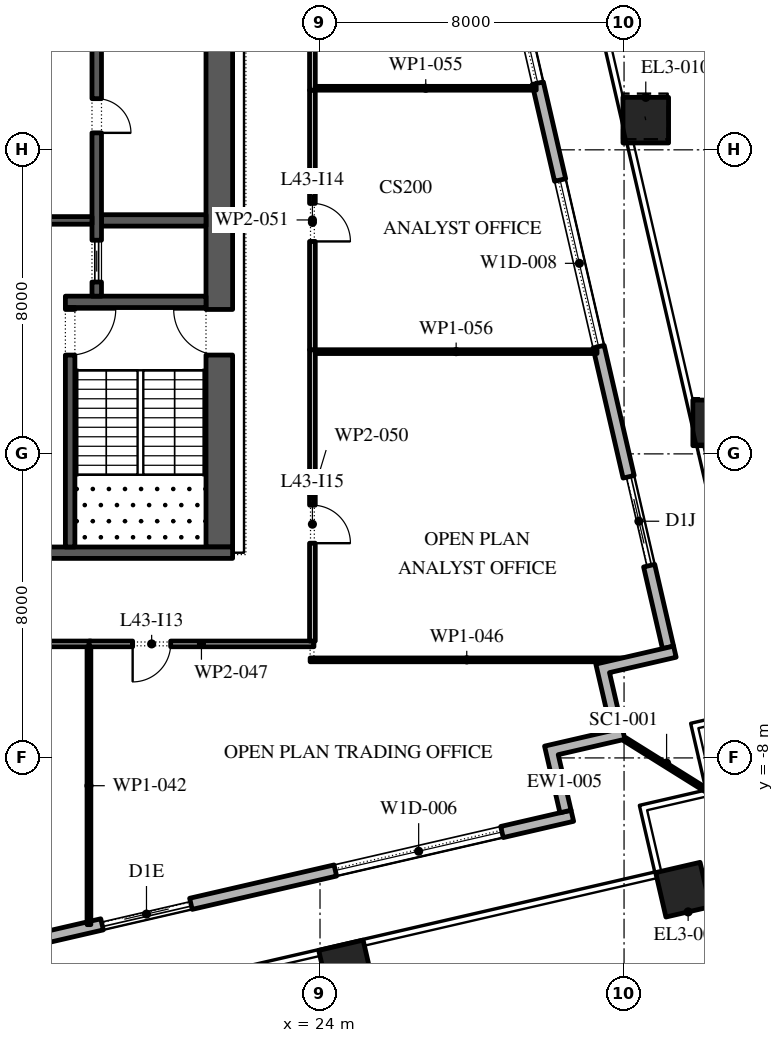
"""IFC4 building model, lengths in metres.
Left out: names, types, materials, properties, quantities, classifications, styles, units other than length and angle.
Written with IfcOpenShell. Run it as: python <this file> out.ifc"""

import sys

from ifc_helpers import new_model, si_unit, direction, frame, frame_2d, origin, origin_2d, place, context, subcontext, project, spatial, polyline, rectangle, outline, extrude, element, fill, save


model = new_model("IFC4")
c1 = context("Model", 3, precision=1e-05, world=origin(), true_north=direction((0.0, 1.0)))
c2 = subcontext(c1, "Body", "Model", "MODEL_VIEW")
j1 = project(units=[si_unit("LENGTHUNIT", "METRE"), si_unit("PLANEANGLEUNIT", "RADIAN")], contexts=[c1])
p1 = place(None, origin())
s1 = spatial("IfcSite", under=j1, at=p1, CompositionType="ELEMENT")
p2 = place(p1, origin())
s2 = spatial("IfcBuilding", under=s1, at=p2, CompositionType="ELEMENT")
p3 = place(p2, frame((0.0, 0.0, 196.8)))
s3 = spatial("IfcBuildingStorey", under=s2, at=p3, CompositionType="ELEMENT", Elevation=196.8)
for number, where, z_axis, x_axis in (
    (1, (24.685, -13.514, 0.0), (0.0, 0.0, 1.0), (0.974, 0.225, 0.0)),
    (2, (33.551, -11.467, 0.0), (0.0, 0.0, 1.0), (0.974, 0.225, 0.0)),
):
    element("IfcColumn", number, at=place(p3, frame(where, z_axis=z_axis, x_axis=x_axis)), inside=s3, PredefinedType="COLUMN", context=c2, shape_type="SweptSolid", body=[
        extrude(rectangle(XDim=1.2, YDim=1.2, at=origin_2d()), origin(), (0.0, 0.0, 1.0), 4.2),
    ])
p4 = place(p3, frame((34.41, 0.816, 0.0), z_axis=(-0.002731884952, 0.01168316756, 0.999928017609), x_axis=(-0.973733900744, -0.227689021567, 0.0)))
e3 = element("IfcColumn", 3, at=p4, inside=s3, PredefinedType="COLUMN", context=c2, shape_type="SweptSolid", body=[
    extrude(rectangle(XDim=1.2, YDim=1.2, at=origin_2d()), origin(), (0.0, 0.0, 1.0), 4.2),
])
p5 = place(p3, frame((32.572, 8.781, 0.0), z_axis=(-0.005404479485, 0.023361298418, 0.999712479335), x_axis=(-0.974268511785, -0.225390476607, 0.0)))
e4 = element("IfcColumn", 4, at=p5, inside=s3, PredefinedType="COLUMN", context=c2, shape_type="SweptSolid", body=[
    extrude(rectangle(XDim=1.2, YDim=1.2, at=origin_2d()), origin(), (0.0, 0.0, 1.0), 4.201),
])
p6 = place(p3, frame((-17.592, -20.657, 0.0), z_axis=(0.0, 0.0, 1.0), x_axis=(0.974370243697, 0.224950279389, 0.0)))
e5 = element("IfcWall", 5, at=p6, inside=s3, PredefinedType="STANDARD", context=c2, shape_type="SweptSolid", body=[
    extrude(rectangle(XDim=49.5, YDim=0.3, at=frame_2d((24.75, 0.0))), origin(), (0.0, 0.0, 1.0), 4.0),
])
p7 = place(p6, frame((2.8, 0.0, 0.0)))
e6 = element("IfcOpeningElement", 6, at=p7, cuts=e5, PredefinedType="OPENING", context=c2, shape_type="SweptSolid", body=[
    extrude(rectangle(XDim=2.4, YDim=3.5, at=frame_2d((1.2, 1.75))), frame((0.0, 0.16, 0.0), z_axis=(0.0, -1.0, 0.0), x_axis=(1.0, 0.0, 0.0)), (0.0, 0.0, 1.0), 0.32),
])
p8 = place(p6, frame((9.9, 0.0, 0.45)))
e7 = element("IfcOpeningElement", 7, at=p8, cuts=e5, PredefinedType="OPENING", context=c2, shape_type="SweptSolid", body=[
    extrude(rectangle(XDim=4.5, YDim=2.575, at=frame_2d((2.25, 1.288))), frame((0.0, 0.16, 0.0), z_axis=(0.0, -1.0, 0.0), x_axis=(1.0, 0.0, 0.0)), (0.0, 0.0, 1.0), 0.32),
])
p9 = place(p6, frame((18.2, 0.0, 0.45)))
e8 = element("IfcOpeningElement", 8, at=p9, cuts=e5, PredefinedType="OPENING", context=c2, shape_type="SweptSolid", body=[
    extrude(rectangle(XDim=4.5, YDim=3.05, at=frame_2d((2.25, 1.525))), frame((0.0, 0.16, 0.0), z_axis=(0.0, -1.0, 0.0), x_axis=(1.0, 0.0, 0.0)), (0.0, 0.0, 1.0), 0.32),
])
p10 = place(p6, frame((26.5, 0.0, 0.45)))
e9 = element("IfcOpeningElement", 9, at=p10, cuts=e5, PredefinedType="OPENING", context=c2, shape_type="SweptSolid", body=[
    extrude(rectangle(XDim=4.5, YDim=2.75, at=frame_2d((2.25, 1.375))), frame((0.0, 0.16, 0.0), z_axis=(0.0, -1.0, 0.0), x_axis=(1.0, 0.0, 0.0)), (0.0, 0.0, 1.0), 0.32),
])
p11 = place(p6, frame((36.8, 0.0, 0.0)))
e10 = element("IfcOpeningElement", 10, at=p11, cuts=e5, PredefinedType="OPENING", context=c2, shape_type="SweptSolid", body=[
    extrude(rectangle(XDim=2.4, YDim=3.275, at=frame_2d((1.2, 1.637))), frame((0.0, 0.16, 0.0), z_axis=(0.0, -1.0, 0.0), x_axis=(1.0, 0.0, 0.0)), (0.0, 0.0, 1.0), 0.32),
])
p12 = place(p6, frame((43.1, 0.0, 0.45)))
e11 = element("IfcOpeningElement", 11, at=p12, cuts=e5, PredefinedType="OPENING", context=c2, shape_type="SweptSolid", body=[
    extrude(rectangle(XDim=4.5, YDim=2.875, at=frame_2d((2.25, 1.438))), frame((0.0, 0.16, 0.0), z_axis=(0.0, -1.0, 0.0), x_axis=(1.0, 0.0, 0.0)), (0.0, 0.0, 1.0), 0.32),
])
p13 = place(p3, frame((33.157, -5.092, 0.0), z_axis=(0.0, 0.0, 1.0), x_axis=(-0.224950279389, 0.974370243697, 0.0)))
e12 = element("IfcWall", 12, at=p13, inside=s3, PredefinedType="STANDARD", context=c2, shape_type="SweptSolid", body=[
    extrude(rectangle(XDim=49.5, YDim=0.3, at=frame_2d((24.75, 0.0))), origin(), (0.0, 0.0, 1.0), 4.0),
])
p14 = place(p13, frame((2.207, 0.0, 0.0)))
e13 = element("IfcOpeningElement", 13, at=p14, cuts=e12, PredefinedType="OPENING", context=c2, shape_type="SweptSolid", body=[
    extrude(rectangle(XDim=2.4, YDim=3.125, at=frame_2d((1.2, 1.562))), frame((0.0, 0.16, 0.0), z_axis=(0.0, -1.0, 0.0), x_axis=(1.0, 0.0, 0.0)), (0.0, 0.0, 1.0), 0.32),
])
p15 = place(p13, frame((8.121, 0.0, 0.45)))
e14 = element("IfcOpeningElement", 14, at=p15, cuts=e12, PredefinedType="OPENING", context=c2, shape_type="SweptSolid", body=[
    extrude(rectangle(XDim=4.5, YDim=2.875, at=frame_2d((2.25, 1.438))), frame((0.0, 0.16, 0.0), z_axis=(0.0, -1.0, 0.0), x_axis=(1.0, 0.0, 0.0)), (0.0, 0.0, 1.0), 0.32),
])
p16 = place(p13, frame((15.236, 0.0, 0.45)))
e15 = element("IfcOpeningElement", 15, at=p16, cuts=e12, PredefinedType="OPENING", context=c2, shape_type="SweptSolid", body=[
    extrude(rectangle(XDim=4.5, YDim=2.875, at=frame_2d((2.25, 1.438))), frame((0.0, 0.16, 0.0), z_axis=(0.0, -1.0, 0.0), x_axis=(1.0, 0.0, 0.0)), (0.0, 0.0, 1.0), 0.32),
])
p17 = place(p13, frame((22.35, 0.0, 0.45)))
e16 = element("IfcOpeningElement", 16, at=p17, cuts=e12, PredefinedType="OPENING", context=c2, shape_type="SweptSolid", body=[
    extrude(rectangle(XDim=4.5, YDim=3.0, at=frame_2d((2.25, 1.5))), frame((0.0, 0.16, 0.0), z_axis=(0.0, -1.0, 0.0), x_axis=(1.0, 0.0, 0.0)), (0.0, 0.0, 1.0), 0.32),
])
p18 = place(p13, frame((30.514, 0.0, 0.0)))
e17 = element("IfcOpeningElement", 17, at=p18, cuts=e12, PredefinedType="OPENING", context=c2, shape_type="SweptSolid", body=[
    extrude(rectangle(XDim=2.4, YDim=3.45, at=frame_2d((1.2, 1.725))), frame((0.0, 0.16, 0.0), z_axis=(0.0, -1.0, 0.0), x_axis=(1.0, 0.0, 0.0)), (0.0, 0.0, 1.0), 0.32),
])
p19 = place(p13, frame((36.579, 0.0, 0.45)))
e18 = element("IfcOpeningElement", 18, at=p19, cuts=e12, PredefinedType="OPENING", context=c2, shape_type="SweptSolid", body=[
    extrude(rectangle(XDim=4.5, YDim=3.05, at=frame_2d((2.25, 1.525))), frame((0.0, 0.16, 0.0), z_axis=(0.0, -1.0, 0.0), x_axis=(1.0, 0.0, 0.0)), (0.0, 0.0, 1.0), 0.32),
])
p20 = place(p13, frame((43.693, 0.0, 0.45)))
e19 = element("IfcOpeningElement", 19, at=p20, cuts=e12, PredefinedType="OPENING", context=c2, shape_type="SweptSolid", body=[
    extrude(rectangle(XDim=4.5, YDim=3.05, at=frame_2d((2.25, 1.525))), frame((0.0, 0.16, 0.0), z_axis=(0.0, -1.0, 0.0), x_axis=(1.0, 0.0, 0.0)), (0.0, 0.0, 1.0), 0.32),
])
p21 = place(p3, origin())
e20 = element("IfcWall", 20, at=p21, inside=s3, PredefinedType="STANDARD", context=c2, shape_type="SweptSolid", body=[
    extrude(outline(polyline([(31.662, -7.285), (31.257, -5.531), (33.303, -5.058), (33.371, -5.351), (31.617, -5.756), (32.022, -7.51), (30.268, -7.914), (30.605, -9.376), (30.313, -9.443), (29.908, -7.69), (31.662, -7.285)])), origin(), (0.0, 0.0, 1.0), 4.0),
])
p22 = place(p3, frame((32.022, -7.51, -0.05), z_axis=(0.0, 0.0, 1.0), x_axis=(0.848047176257, -0.529920736377, 0.0)))
e21 = element("IfcWall", 21, at=p22, inside=s3, PredefinedType="STANDARD", context=c2, shape_type="SweptSolid", body=[
    extrude(rectangle(XDim=2.526, YDim=0.1, at=frame_2d((1.263, 0.0))), origin(), (0.0, 0.0, 1.0), 4.05),
])
p23 = place(p3, frame((21.35, -2.45, 0.0), z_axis=(0.0, 0.0, 1.0), x_axis=(0.0, 1.0, 0.0)))
e22 = element("IfcWall", 22, at=p23, inside=s3, PredefinedType="SHEAR", context=c2, shape_type="SweptSolid", body=[
    extrude(rectangle(XDim=27.9, YDim=0.7, at=frame_2d((13.95, 0.0))), origin(), (0.0, 0.0, 1.0), 4.0),
])
p24 = place(p23, frame((5.05, 0.0, 0.0)))
e23 = element("IfcOpeningElement", 23, at=p24, cuts=e22, PredefinedType="OPENING", context=c2, shape_type="SweptSolid", body=[
    extrude(rectangle(XDim=1.2, YDim=2.1, at=frame_2d((0.6, 1.05))), frame((0.0, 0.36, 0.0), z_axis=(0.0, -1.0, 0.0), x_axis=(1.0, 0.0, 0.0)), (0.0, 0.0, 1.0), 0.72),
])
p25 = place(p23, frame((21.65, 0.0, 0.0)))
e24 = element("IfcOpeningElement", 24, at=p25, cuts=e22, PredefinedType="OPENING", context=c2, shape_type="SweptSolid", body=[
    extrude(rectangle(XDim=1.2, YDim=2.1, at=frame_2d((0.6, 1.05))), frame((0.0, 0.36, 0.0), z_axis=(0.0, -1.0, 0.0), x_axis=(1.0, 0.0, 0.0)), (0.0, 0.0, 1.0), 0.72),
])
p26 = place(p3, frame((10.3, -2.6, 0.0), z_axis=(0.0, 0.0, 1.0), x_axis=(1.0, 0.0, 0.0)))
e25 = element("IfcWall", 25, at=p26, inside=s3, PredefinedType="SHEAR", context=c2, shape_type="SweptSolid", body=[
    extrude(rectangle(XDim=11.4, YDim=0.3, at=frame_2d((5.7, 0.0))), origin(), (0.0, 0.0, 1.0), 4.0),
])
p27 = place(p3, frame((17.3, 4.0, 0.0), z_axis=(0.0, 0.0, 1.0), x_axis=(1.0, 0.0, 0.0)))
e26 = element("IfcWall", 26, at=p27, inside=s3, PredefinedType="SHEAR", context=c2, shape_type="SweptSolid", body=[
    extrude(rectangle(XDim=3.7, YDim=0.3, at=frame_2d((1.85, 0.0))), origin(), (0.0, 0.0, 1.0), 4.0),
])
p28 = place(p3, frame((17.425, -2.45, 0.0), z_axis=(0.0, 0.0, 1.0), x_axis=(0.0, 1.0, 0.0)))
e27 = element("IfcWall", 27, at=p28, inside=s3, PredefinedType="SHEAR", context=c2, shape_type="SweptSolid", body=[
    extrude(rectangle(XDim=6.3, YDim=0.25, at=frame_2d((3.15, 0.0))), origin(), (0.0, 0.0, 1.0), 4.0),
])
p29 = place(p28, frame((5.05, 0.0, 0.0)))
e28 = element("IfcOpeningElement", 28, at=p29, cuts=e27, PredefinedType="OPENING", context=c2, shape_type="SweptSolid", body=[
    extrude(rectangle(XDim=1.2, YDim=2.1, at=frame_2d((0.6, 1.05))), frame((0.0, 0.135, 0.0), z_axis=(0.0, -1.0, 0.0), x_axis=(1.0, 0.0, 0.0)), (0.0, 0.0, 1.0), 0.27),
])
p30 = place(p3, frame((18.25, 6.143, 0.0), z_axis=(0.0, 0.0, 1.0), x_axis=(1.0, 0.0, 0.0)))
e29 = element("IfcWall", 29, at=p30, inside=s3, PredefinedType="SHEAR", context=c2, shape_type="SweptSolid", body=[
    extrude(rectangle(XDim=2.75, YDim=0.3, at=frame_2d((1.375, 0.0))), origin(), (0.0, 0.0, 1.0), 4.0),
])
p31 = place(p3, frame((18.125, 4.15, 0.0), z_axis=(0.0, 0.0, 1.0), x_axis=(0.0, 1.0, 0.0)))
e30 = element("IfcWall", 30, at=p31, inside=s3, PredefinedType="SHEAR", context=c2, shape_type="SweptSolid", body=[
    extrude(rectangle(XDim=14.7, YDim=0.25, at=frame_2d((7.35, 0.0))), origin(), (0.0, 0.0, 1.0), 4.0),
])
p32 = place(p31, frame((4.296, 0.0, 0.0)))
e31 = element("IfcOpeningElement", 31, at=p32, cuts=e30, PredefinedType="OPENING", context=c2, shape_type="SweptSolid", body=[
    extrude(rectangle(XDim=0.9, YDim=2.1, at=frame_2d((0.45, 1.05))), frame((0.0, 0.135, 0.0), z_axis=(0.0, -1.0, 0.0), x_axis=(1.0, 0.0, 0.0)), (0.0, 0.0, 1.0), 0.27),
])
p33 = place(p31, frame((9.504, 0.0, 0.0)))
e32 = element("IfcOpeningElement", 32, at=p33, cuts=e30, PredefinedType="OPENING", context=c2, shape_type="SweptSolid", body=[
    extrude(rectangle(XDim=0.9, YDim=2.1, at=frame_2d((0.45, 1.05))), frame((0.0, 0.135, 0.0), z_axis=(0.0, -1.0, 0.0), x_axis=(1.0, 0.0, 0.0)), (0.0, 0.0, 1.0), 0.27),
])
p34 = place(p31, frame((0.371, 0.0, 0.0)))
e33 = element("IfcOpeningElement", 33, at=p34, cuts=e30, PredefinedType="OPENING", context=c2, shape_type="SweptSolid", body=[
    extrude(rectangle(XDim=1.1, YDim=2.1, at=frame_2d((0.55, 1.05))), frame((0.0, 0.135, 0.0), z_axis=(0.0, -1.0, 0.0), x_axis=(1.0, 0.0, 0.0)), (0.0, 0.0, 1.0), 0.27),
])
p35 = place(p31, frame((13.229, 0.0, 0.0)))
e34 = element("IfcOpeningElement", 34, at=p35, cuts=e30, PredefinedType="OPENING", context=c2, shape_type="SweptSolid", body=[
    extrude(rectangle(XDim=1.1, YDim=2.1, at=frame_2d((0.55, 1.05))), frame((0.0, 0.135, 0.0), z_axis=(0.0, -1.0, 0.0), x_axis=(1.0, 0.0, 0.0)), (0.0, 0.0, 1.0), 0.27),
])
p36 = place(p3, frame((14.0, 6.143, 0.0), z_axis=(0.0, 0.0, 1.0), x_axis=(1.0, 0.0, 0.0)))
e35 = element("IfcWall", 35, at=p36, inside=s3, PredefinedType="SHEAR", context=c2, shape_type="SweptSolid", body=[
    extrude(rectangle(XDim=4.0, YDim=0.2, at=frame_2d((2.0, 0.0))), origin(), (0.0, 0.0, 1.0), 4.0),
])
p37 = place(p36, frame((1.4, 0.0, 0.0)))
e36 = element("IfcOpeningElement", 36, at=p37, cuts=e35, PredefinedType="OPENING", context=c2, shape_type="SweptSolid", body=[
    extrude(rectangle(XDim=1.2, YDim=2.1, at=frame_2d((0.6, 1.05))), frame((0.0, 0.11, 0.0), z_axis=(0.0, -1.0, 0.0), x_axis=(1.0, 0.0, 0.0)), (0.0, 0.0, 1.0), 0.22),
])
p38 = place(p3, frame((17.97, -5.0, 0.0), z_axis=(0.0, 0.0, 1.0), x_axis=(-1.0, 0.0, 0.0)))
e37 = element("IfcWall", 37, at=p38, inside=s3, PredefinedType="PARTITIONING", context=c2, shape_type="SweptSolid", body=[
    extrude(rectangle(XDim=7.97, YDim=0.15, at=frame_2d((3.985, 0.0))), origin(), (0.0, 0.0, 1.0), 4.0),
])
p39 = place(p3, frame((17.92, -5.075, 0.0), z_axis=(0.0, 0.0, 1.0), x_axis=(0.0, -1.0, 0.0)))
e38 = element("IfcWall", 38, at=p39, inside=s3, PredefinedType="PARTITIONING", context=c2, shape_type="SweptSolid", body=[
    extrude(rectangle(XDim=7.312, YDim=0.1, at=frame_2d((3.656, 0.0))), origin(), (0.0, 0.0, 1.0), 4.0),
])
p40 = place(p3, frame((23.74, -5.42, 0.0), z_axis=(0.0, 0.0, 1.0), x_axis=(1.0, 0.0, 0.0)))
e39 = element("IfcWall", 39, at=p40, inside=s3, PredefinedType="PARTITIONING", context=c2, shape_type="SweptSolid", body=[
    extrude(rectangle(XDim=8.242, YDim=0.1, at=frame_2d((4.121, 0.0))), origin(), (0.0, 0.0, 1.0), 4.0),
])
p41 = place(p3, frame((23.84, -5.0, 0.0), z_axis=(0.0, 0.0, 1.0), x_axis=(-1.0, 0.0, 0.0)))
e40 = element("IfcWall", 40, at=p41, inside=s3, PredefinedType="PARTITIONING", context=c2, shape_type="SweptSolid", body=[
    extrude(rectangle(XDim=5.92, YDim=0.15, at=frame_2d((2.96, 0.0))), origin(), (0.0, 0.0, 1.0), 4.0),
])
p42 = place(p41, frame((3.77, 0.0, 0.0)))
e41 = element("IfcOpeningElement", 41, at=p42, cuts=e40, PredefinedType="OPENING", context=c2, shape_type="SweptSolid", body=[
    extrude(rectangle(XDim=1.0, YDim=2.1, at=frame_2d((0.5, 1.05))), frame((0.0, 0.085, 0.0), z_axis=(0.0, -1.0, 0.0), x_axis=(1.0, 0.0, 0.0)), (0.0, 0.0, 1.0), 0.17),
])
p43 = place(p3, frame((23.8, 2.74, 0.0), z_axis=(0.0, 0.0, 1.0), x_axis=(0.0, -1.0, 0.0)))
e42 = element("IfcWall", 42, at=p43, inside=s3, PredefinedType="PARTITIONING", context=c2, shape_type="SweptSolid", body=[
    extrude(rectangle(XDim=7.665, YDim=0.15, at=frame_2d((3.833, 0.0))), origin(), (0.0, 0.0, 1.0), 4.0),
])
p44 = place(p43, frame((4.09, 0.0, 0.0)))
e43 = element("IfcOpeningElement", 43, at=p44, cuts=e42, PredefinedType="OPENING", context=c2, shape_type="SweptSolid", body=[
    extrude(rectangle(XDim=1.0, YDim=2.1, at=frame_2d((0.5, 1.05))), frame((0.0, 0.085, 0.0), z_axis=(0.0, -1.0, 0.0), x_axis=(1.0, 0.0, 0.0)), (0.0, 0.0, 1.0), 0.17),
])
p45 = place(p3, frame((23.8, 9.57, 0.0), z_axis=(0.0, 0.0, 1.0), x_axis=(0.0, -1.0, 0.0)))
e44 = element("IfcWall", 44, at=p45, inside=s3, PredefinedType="PARTITIONING", context=c2, shape_type="SweptSolid", body=[
    extrude(rectangle(XDim=6.83, YDim=0.15, at=frame_2d((3.415, 0.0))), origin(), (0.0, 0.0, 1.0), 4.0),
])
p46 = place(p45, frame((2.98, 0.0, 0.0)))
e45 = element("IfcOpeningElement", 45, at=p46, cuts=e44, PredefinedType="OPENING", context=c2, shape_type="SweptSolid", body=[
    extrude(rectangle(XDim=1.0, YDim=2.1, at=frame_2d((0.5, 1.05))), frame((0.0, 0.085, 0.0), z_axis=(0.0, -1.0, 0.0), x_axis=(1.0, 0.0, 0.0)), (0.0, 0.0, 1.0), 0.17),
])
p47 = place(p3, frame((23.8, 16.5, 0.0), z_axis=(0.0, 0.0, 1.0), x_axis=(0.0, -1.0, 0.0)))
e46 = element("IfcWall", 46, at=p47, inside=s3, PredefinedType="PARTITIONING", context=c2, shape_type="SweptSolid", body=[
    extrude(rectangle(XDim=6.93, YDim=0.15, at=frame_2d((3.465, 0.0))), origin(), (0.0, 0.0, 1.0), 4.0),
])
p48 = place(p47, frame((2.98, 0.0, 0.0)))
e47 = element("IfcOpeningElement", 47, at=p48, cuts=e46, PredefinedType="OPENING", context=c2, shape_type="SweptSolid", body=[
    extrude(rectangle(XDim=1.0, YDim=2.1, at=frame_2d((0.5, 1.05))), frame((0.0, 0.085, 0.0), z_axis=(0.0, -1.0, 0.0), x_axis=(1.0, 0.0, 0.0)), (0.0, 0.0, 1.0), 0.17),
])
p49 = place(p3, frame((29.689, 9.62, 0.0), z_axis=(0.0, 0.0, 1.0), x_axis=(-1.0, 0.0, 0.0)))
e48 = element("IfcWall", 48, at=p49, inside=s3, PredefinedType="PARTITIONING", context=c2, shape_type="SweptSolid", body=[
    extrude(rectangle(XDim=5.814, YDim=0.1, at=frame_2d((2.907, 0.0))), origin(), (0.0, 0.0, 1.0), 4.0),
])
p50 = place(p3, frame((31.289, 2.69, 0.0), z_axis=(0.0, 0.0, 1.0), x_axis=(-1.0, 0.0, 0.0)))
e49 = element("IfcWall", 49, at=p50, inside=s3, PredefinedType="PARTITIONING", context=c2, shape_type="SweptSolid", body=[
    extrude(rectangle(XDim=7.414, YDim=0.1, at=frame_2d((3.707, 0.0))), origin(), (0.0, 0.0, 1.0), 4.0),
])
p51 = place(p11, origin())
e50 = element("IfcDoor", 50, at=p51, inside=s3, OperationType="DOUBLE_DOOR_SLIDING", PredefinedType="DOOR", context=c2, shape_type="SweptSolid", body=[
    extrude(rectangle(XDim=2.4, YDim=3.275, at=frame_2d((1.2, 1.637))), frame((0.0, 0.025, 0.0), z_axis=(0.0, -1.0, 0.0), x_axis=(1.0, 0.0, 0.0)), (0.0, 0.0, 1.0), 0.05),
])
fill(e10, e50)
p52 = place(p12, origin())
e51 = element("IfcWindow", 51, at=p52, inside=s3, PartitioningType="DOUBLE_PANEL_VERTICAL", PredefinedType="WINDOW", context=c2, shape_type="SweptSolid", body=[
    extrude(rectangle(XDim=4.5, YDim=2.875, at=frame_2d((2.25, 1.438))), frame((0.0, 0.03, 0.0), z_axis=(0.0, -1.0, 0.0), x_axis=(1.0, 0.0, 0.0)), (0.0, 0.0, 1.0), 0.06),
])
fill(e11, e51)
p53 = place(p14, origin())
e52 = element("IfcDoor", 52, at=p53, inside=s3, OperationType="DOUBLE_DOOR_SLIDING", PredefinedType="DOOR", context=c2, shape_type="SweptSolid", body=[
    extrude(rectangle(XDim=2.4, YDim=3.125, at=frame_2d((1.2, 1.562))), frame((0.0, 0.025, 0.0), z_axis=(0.0, -1.0, 0.0), x_axis=(1.0, 0.0, 0.0)), (0.0, 0.0, 1.0), 0.05),
])
fill(e13, e52)
p54 = place(p15, origin())
e53 = element("IfcWindow", 53, at=p54, inside=s3, PartitioningType="DOUBLE_PANEL_VERTICAL", PredefinedType="WINDOW", context=c2, shape_type="SweptSolid", body=[
    extrude(rectangle(XDim=4.5, YDim=2.875, at=frame_2d((2.25, 1.438))), frame((0.0, 0.03, 0.0), z_axis=(0.0, -1.0, 0.0), x_axis=(1.0, 0.0, 0.0)), (0.0, 0.0, 1.0), 0.06),
])
fill(e14, e53)
p55 = place(p16, origin())
e54 = element("IfcWindow", 54, at=p55, inside=s3, PartitioningType="DOUBLE_PANEL_VERTICAL", PredefinedType="WINDOW", context=c2, shape_type="SweptSolid", body=[
    extrude(rectangle(XDim=4.5, YDim=2.875, at=frame_2d((2.25, 1.438))), frame((0.0, 0.03, 0.0), z_axis=(0.0, -1.0, 0.0), x_axis=(1.0, 0.0, 0.0)), (0.0, 0.0, 1.0), 0.06),
])
fill(e15, e54)
p56 = place(p32, frame((0.9, -0.2, 0.0), z_axis=(0.0, 0.0, 1.0), x_axis=(-1.0, 0.0, 0.0)))
e55 = element("IfcDoor", 55, at=p56, inside=s3, OperationType="SINGLE_SWING_LEFT", PredefinedType="DOOR", context=c2, shape_type="SweptSolid", body=[
    extrude(rectangle(XDim=0.9, YDim=2.1, at=frame_2d((0.45, 1.05))), frame((0.0, -0.075, 0.0), z_axis=(0.0, -1.0, 0.0), x_axis=(1.0, 0.0, 0.0)), (0.0, 0.0, 1.0), 0.05),
])
fill(e31, e55)
p57 = place(p34, origin())
e56 = element("IfcDoor", 56, at=p57, inside=s3, OperationType="SLIDING_TO_LEFT", PredefinedType="DOOR", context=c2, shape_type="SweptSolid", body=[
    extrude(rectangle(XDim=1.1, YDim=2.1, at=frame_2d((0.55, 1.05))), frame((0.0, 0.025, 0.0), z_axis=(0.0, -1.0, 0.0), x_axis=(1.0, 0.0, 0.0)), (0.0, 0.0, 1.0), 0.05),
])
fill(e33, e56)
p58 = place(p29, frame((1.2, 0.0, 0.0), z_axis=(0.0, 0.0, 1.0), x_axis=(-1.0, 0.0, 0.0)))
e57 = element("IfcDoor", 57, at=p58, inside=s3, OperationType="SINGLE_SWING_RIGHT", PredefinedType="DOOR", context=c2, shape_type="SweptSolid", body=[
    extrude(rectangle(XDim=1.2, YDim=2.1, at=frame_2d((0.6, 1.05))), frame((0.0, 0.025, 0.0), z_axis=(0.0, -1.0, 0.0), x_axis=(1.0, 0.0, 0.0)), (0.0, 0.0, 1.0), 0.05),
])
fill(e28, e57)
p59 = place(p24, origin())
e58 = element("IfcDoor", 58, at=p59, inside=s3, OperationType="SINGLE_SWING_LEFT", PredefinedType="DOOR", context=c2, shape_type="SweptSolid", body=[
    extrude(rectangle(XDim=1.2, YDim=2.1, at=frame_2d((0.6, 1.05))), frame((0.0, 0.025, 0.0), z_axis=(0.0, -1.0, 0.0), x_axis=(1.0, 0.0, 0.0)), (0.0, 0.0, 1.0), 0.05),
])
fill(e23, e58)
p60 = place(p42, origin())
e59 = element("IfcDoor", 59, at=p60, inside=s3, OperationType="SINGLE_SWING_LEFT", PredefinedType="DOOR", context=c2, shape_type="SweptSolid", body=[
    extrude(rectangle(XDim=1.0, YDim=2.1, at=frame_2d((0.5, 1.05))), frame((0.0, 0.025, 0.0), z_axis=(0.0, -1.0, 0.0), x_axis=(1.0, 0.0, 0.0)), (0.0, 0.0, 1.0), 0.05),
])
fill(e41, e59)
p61 = place(p46, origin())
e60 = element("IfcDoor", 60, at=p61, inside=s3, OperationType="SINGLE_SWING_LEFT", PredefinedType="DOOR", context=c2, shape_type="SweptSolid", body=[
    extrude(rectangle(XDim=1.0, YDim=2.1, at=frame_2d((0.5, 1.05))), frame((0.0, 0.025, 0.0), z_axis=(0.0, -1.0, 0.0), x_axis=(1.0, 0.0, 0.0)), (0.0, 0.0, 1.0), 0.05),
])
fill(e45, e60)
p62 = place(p44, origin())
e61 = element("IfcDoor", 61, at=p62, inside=s3, OperationType="SINGLE_SWING_LEFT", PredefinedType="DOOR", context=c2, shape_type="SweptSolid", body=[
    extrude(rectangle(XDim=1.0, YDim=2.1, at=frame_2d((0.5, 1.05))), frame((0.0, 0.025, 0.0), z_axis=(0.0, -1.0, 0.0), x_axis=(1.0, 0.0, 0.0)), (0.0, 0.0, 1.0), 0.05),
])
fill(e43, e61)
save(model, sys.argv[1])
